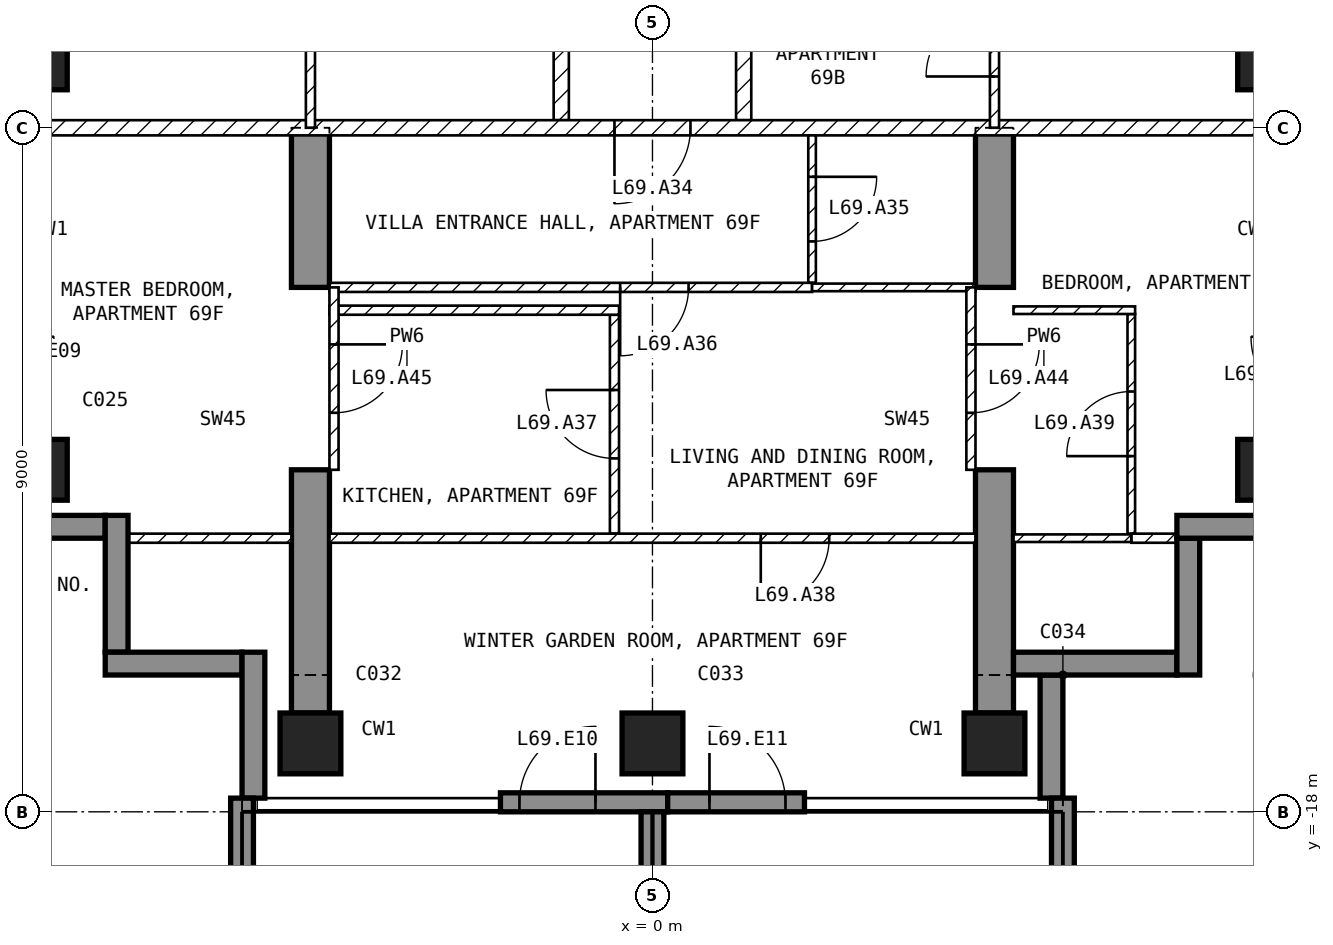
"""IFC4 building model, lengths in metres.
Left out: names, types, materials, properties, quantities, classifications, styles, units other than length and angle.
Written with IfcOpenShell. Run it as: python <this file> out.ifc"""

import sys

from ifc_helpers import new_model, si_unit, direction, frame, frame_2d, origin, origin_2d, place, context, subcontext, project, spatial, polyline, rectangle, outline, extrude, element, fill, save


model = new_model("IFC4")
c1 = context("Model", 3, precision=1e-05, world=origin(), true_north=direction((0.0, 1.0)))
c2 = subcontext(c1, "Body", "Model", "MODEL_VIEW")
j1 = project(units=[si_unit("LENGTHUNIT", "METRE"), si_unit("PLANEANGLEUNIT", "RADIAN")], contexts=[c1])
p1 = place(None, origin())
s1 = spatial("IfcSite", under=j1, at=p1, CompositionType="ELEMENT")
p2 = place(p1, origin())
s2 = spatial("IfcBuilding", under=s1, at=p2, CompositionType="ELEMENT")
p3 = place(p2, frame((0.0, 0.0, 271.0)))
s3 = spatial("IfcBuildingStorey", under=s2, at=p3, CompositionType="ELEMENT", Elevation=271.0)
for number, where, z_axis, x_axis in (
    (1, (-8.1, -13.5, -0.25), (0.0, 0.0, 1.0), (1.0, 0.0, 0.0)),
    (2, (-8.1, -8.1, -0.25), (0.0, 0.0, 1.0), (1.0, 0.0, 0.0)),
    (3, (-4.5, -17.1, -0.25), (0.0, 0.0, 1.0), (1.0, 0.0, 0.0)),
    (4, (0.0, -17.1, -0.25), (0.0, 0.0, 1.0), (1.0, 0.0, 0.0)),
    (5, (4.5, -17.1, -0.25), (0.0, 0.0, 1.0), (1.0, 0.0, 0.0)),
    (6, (8.1, -13.5, -0.25), (0.0, 0.0, 1.0), (1.0, 0.0, 0.0)),
    (7, (8.1, -8.1, -0.25), (0.0, 0.0, 1.0), (1.0, 0.0, 0.0)),
):
    element("IfcColumn", number, at=place(p3, frame(where, z_axis=z_axis, x_axis=x_axis)), inside=s3, PredefinedType="COLUMN", context=c2, shape_type="SweptSolid", body=[
        extrude(rectangle(XDim=0.8, YDim=0.8, at=origin_2d()), origin(), (0.0, 0.0, 1.0), 3.5),
    ])
for number, where, z_axis, x_axis in (
    (8, (-4.75, -16.7, -0.25), (1.0, 0.0, 0.0), (0.0, 1.0, 0.0)),
    (9, (4.25, -16.7, -0.25), (1.0, 0.0, 0.0), (0.0, 1.0, 0.0)),
):
    element("IfcWall", number, at=place(p3, frame(where, z_axis=z_axis, x_axis=x_axis)), inside=s3, PredefinedType="SHEAR", context=c2, shape_type="SweptSolid", body=[
        extrude(outline(polyline([(0.0, 0.0), (3.2, 0.0), (3.2, 2.65), (5.6, 2.65), (5.6, 0.0), (7.7, 0.0), (7.7, 3.5), (0.0, 3.5), (0.0, 0.0)])), origin(), (0.0, 0.0, 1.0), 0.5),
    ])
p4 = place(p3, frame((-2.0, -17.875, 0.0), z_axis=(0.0, 0.0, 1.0), x_axis=(1.0, 0.0, 0.0)))
e10 = element("IfcWall", 10, at=p4, inside=s3, PredefinedType="SOLIDWALL", context=c2, shape_type="SweptSolid", body=[
    extrude(rectangle(XDim=2.2, YDim=0.25, at=frame_2d((1.1, 0.0))), origin(), (0.0, 0.0, 1.0), 3.25),
])
p5 = place(p4, frame((0.25, 0.0, 0.0)))
e11 = element("IfcOpeningElement", 11, at=p5, cuts=e10, PredefinedType="OPENING", context=c2, shape_type="SweptSolid", body=[
    extrude(rectangle(XDim=1.0, YDim=2.4, at=frame_2d((0.5, 1.2))), frame((0.0, 0.135, 0.0), z_axis=(0.0, -1.0, 0.0), x_axis=(1.0, 0.0, 0.0)), (0.0, 0.0, 1.0), 0.27),
])
p6 = place(p3, frame((0.2, -17.875, 0.0), z_axis=(0.0, 0.0, 1.0), x_axis=(1.0, 0.0, 0.0)))
e12 = element("IfcWall", 12, at=p6, inside=s3, PredefinedType="SOLIDWALL", context=c2, shape_type="SweptSolid", body=[
    extrude(rectangle(XDim=1.8, YDim=0.25, at=frame_2d((0.9, 0.0))), origin(), (0.0, 0.0, 1.0), 3.25),
])
p7 = place(p6, frame((0.55, 0.0, 0.0)))
e13 = element("IfcOpeningElement", 13, at=p7, cuts=e12, PredefinedType="OPENING", context=c2, shape_type="SweptSolid", body=[
    extrude(rectangle(XDim=1.0, YDim=2.4, at=frame_2d((0.5, 1.2))), frame((0.0, 0.135, 0.0), z_axis=(0.0, -1.0, 0.0), x_axis=(1.0, 0.0, 0.0)), (0.0, 0.0, 1.0), 0.27),
])
p8 = place(p3, frame((5.25, -17.82, 0.0), z_axis=(0.0, 0.0, 1.0), x_axis=(0.0, 1.0, 0.0)))
e14 = element("IfcWall", 14, at=p8, inside=s3, PredefinedType="SOLIDWALL", context=c2, shape_type="SweptSolid", body=[
    extrude(rectangle(XDim=1.62, YDim=0.3, at=frame_2d((0.81, 0.0))), origin(), (0.0, 0.0, 1.0), 3.25),
])
p9 = place(p3, frame((4.75, -16.05, 0.0), z_axis=(0.0, 0.0, 1.0), x_axis=(1.0, 0.0, 0.0)))
e15 = element("IfcWall", 15, at=p9, inside=s3, PredefinedType="SOLIDWALL", context=c2, shape_type="SweptSolid", body=[
    extrude(rectangle(XDim=2.15, YDim=0.3, at=frame_2d((1.075, 0.0))), origin(), (0.0, 0.0, 1.0), 3.25),
])
p10 = place(p3, frame((7.05, -16.2, 0.0), z_axis=(0.0, 0.0, 1.0), x_axis=(0.0, 1.0, 0.0)))
e16 = element("IfcWall", 16, at=p10, inside=s3, PredefinedType="SOLIDWALL", context=c2, shape_type="SweptSolid", body=[
    extrude(rectangle(XDim=1.8, YDim=0.3, at=frame_2d((0.9, 0.0))), origin(), (0.0, 0.0, 1.0), 3.25),
])
p11 = place(p3, frame((6.9, -14.25, 0.0), z_axis=(0.0, 0.0, 1.0), x_axis=(1.0, 0.0, 0.0)))
e17 = element("IfcWall", 17, at=p11, inside=s3, PredefinedType="SOLIDWALL", context=c2, shape_type="SweptSolid", body=[
    extrude(rectangle(XDim=1.85, YDim=0.3, at=frame_2d((0.925, 0.0))), origin(), (0.0, 0.0, 1.0), 3.25),
])
p12 = place(p3, frame((-8.75, -14.25, 0.0), z_axis=(0.0, 0.0, 1.0), x_axis=(1.0, 0.0, 0.0)))
e18 = element("IfcWall", 18, at=p12, inside=s3, PredefinedType="SOLIDWALL", context=c2, shape_type="SweptSolid", body=[
    extrude(rectangle(XDim=1.55, YDim=0.3, at=frame_2d((0.775, 0.0))), origin(), (0.0, 0.0, 1.0), 3.25),
])
p13 = place(p3, frame((-7.05, -14.1, 0.0), z_axis=(0.0, 0.0, 1.0), x_axis=(0.0, -1.0, 0.0)))
e19 = element("IfcWall", 19, at=p13, inside=s3, PredefinedType="SOLIDWALL", context=c2, shape_type="SweptSolid", body=[
    extrude(rectangle(XDim=1.8, YDim=0.3, at=frame_2d((0.9, 0.0))), origin(), (0.0, 0.0, 1.0), 3.25),
])
p14 = place(p3, frame((-7.2, -16.05, 0.0), z_axis=(0.0, 0.0, 1.0), x_axis=(1.0, 0.0, 0.0)))
e20 = element("IfcWall", 20, at=p14, inside=s3, PredefinedType="SOLIDWALL", context=c2, shape_type="SweptSolid", body=[
    extrude(rectangle(XDim=1.8, YDim=0.3, at=frame_2d((0.9, 0.0))), origin(), (0.0, 0.0, 1.0), 3.25),
])
p15 = place(p3, frame((-5.25, -15.9, 0.0), z_axis=(0.0, 0.0, 1.0), x_axis=(0.0, -1.0, 0.0)))
e21 = element("IfcWall", 21, at=p15, inside=s3, PredefinedType="SOLIDWALL", context=c2, shape_type="SweptSolid", body=[
    extrude(rectangle(XDim=1.92, YDim=0.3, at=frame_2d((0.96, 0.0))), origin(), (0.0, 0.0, 1.0), 3.25),
])
p16 = place(p3, frame((-5.4, -17.82, 0.0), z_axis=(0.0, 0.0, 1.0), x_axis=(0.0, -1.0, 0.0)))
e22 = element("IfcWall", 22, at=p16, inside=s3, PredefinedType="SOLIDWALL", context=c2, shape_type="SweptSolid", body=[
    extrude(rectangle(XDim=2.88, YDim=0.3, at=frame_2d((1.44, 0.0))), origin(), (0.0, 0.0, 1.0), 3.25),
])
p17 = place(p3, frame((0.0, -18.0, 0.0), z_axis=(0.0, 0.0, 1.0), x_axis=(0.0, -1.0, 0.0)))
e23 = element("IfcWall", 23, at=p17, inside=s3, PredefinedType="SOLIDWALL", context=c2, shape_type="SweptSolid", body=[
    extrude(rectangle(XDim=2.7, YDim=0.3, at=frame_2d((1.35, 0.0))), origin(), (0.0, 0.0, 1.0), 3.25),
])
p18 = place(p3, frame((5.4, -17.82, 0.0), z_axis=(0.0, 0.0, 1.0), x_axis=(0.0, -1.0, 0.0)))
e24 = element("IfcWall", 24, at=p18, inside=s3, PredefinedType="SOLIDWALL", context=c2, shape_type="SweptSolid", body=[
    extrude(rectangle(XDim=2.88, YDim=0.3, at=frame_2d((1.44, 0.0))), origin(), (0.0, 0.0, 1.0), 3.25),
])
for number, where, z_axis, x_axis in (
    (25, (1.2, -4.6, 0.0), (0.0, 0.0, 1.0), (0.0, -1.0, 0.0)),
    (26, (-1.2, -8.9, 0.0), (0.0, 0.0, 1.0), (0.0, 1.0, 0.0)),
):
    element("IfcWall", number, at=place(p3, frame(where, z_axis=z_axis, x_axis=x_axis)), inside=s3, PredefinedType="PARTITIONING", context=c2, shape_type="SweptSolid", body=[
        extrude(rectangle(XDim=4.3, YDim=0.2, at=frame_2d((2.15, 0.0))), origin(), (0.0, 0.0, 1.0), 3.25),
    ])
p19 = place(p3, frame((8.92, -9.0, 0.0), z_axis=(0.0, 0.0, 1.0), x_axis=(-1.0, 0.0, 0.0)))
e27 = element("IfcWall", 27, at=p19, inside=s3, PredefinedType="PARTITIONING", context=c2, shape_type="SweptSolid", body=[
    extrude(rectangle(XDim=17.84, YDim=0.2, at=frame_2d((8.92, 0.0))), origin(), (0.0, 0.0, 1.0), 3.25),
])
p20 = place(p19, frame((8.42, 0.0, 0.0)))
e28 = element("IfcOpeningElement", 28, at=p20, cuts=e27, PredefinedType="OPENING", context=c2, shape_type="SweptSolid", body=[
    extrude(rectangle(XDim=1.0, YDim=2.1, at=frame_2d((0.5, 1.05))), frame((0.0, 0.11, 0.0), z_axis=(0.0, -1.0, 0.0), x_axis=(1.0, 0.0, 0.0)), (0.0, 0.0, 1.0), 0.22),
])
p21 = place(p3, frame((4.5, -9.0, 0.0), z_axis=(0.0, 0.0, 1.0), x_axis=(0.0, 1.0, 0.0)))
e29 = element("IfcWall", 29, at=p21, inside=s3, PredefinedType="PARTITIONING", context=c2, shape_type="SweptSolid", body=[
    extrude(rectangle(XDim=2.25, YDim=0.12, at=frame_2d((1.125, 0.0))), origin(), (0.0, 0.0, 1.0), 3.25),
])
p22 = place(p21, frame((0.675, 0.0, 0.0)))
e30 = element("IfcOpeningElement", 30, at=p22, cuts=e29, PredefinedType="OPENING", context=c2, shape_type="SweptSolid", body=[
    extrude(rectangle(XDim=0.9, YDim=2.1, at=frame_2d((0.45, 1.05))), frame((0.0, 0.07, 0.0), z_axis=(0.0, -1.0, 0.0), x_axis=(1.0, 0.0, 0.0)), (0.0, 0.0, 1.0), 0.14),
])
p23 = place(p3, frame((-4.5, -4.5, 0.0), z_axis=(0.0, 0.0, 1.0), x_axis=(0.0, -1.0, 0.0)))
e31 = element("IfcWall", 31, at=p23, inside=s3, PredefinedType="PARTITIONING", context=c2, shape_type="SweptSolid", body=[
    extrude(rectangle(XDim=4.5, YDim=0.12, at=frame_2d((2.25, 0.0))), origin(), (0.0, 0.0, 1.0), 3.25),
])
p24 = place(p23, frame((1.8, 0.0, 0.0)))
e32 = element("IfcOpeningElement", 32, at=p24, cuts=e31, PredefinedType="OPENING", context=c2, shape_type="SweptSolid", body=[
    extrude(rectangle(XDim=0.9, YDim=2.1, at=frame_2d((0.45, 1.05))), frame((0.0, 0.07, 0.0), z_axis=(0.0, -1.0, 0.0), x_axis=(1.0, 0.0, 0.0)), (0.0, 0.0, 1.0), 0.14),
])
p25 = place(p3, frame((2.1, -9.1, 0.0), z_axis=(0.0, 0.0, 1.0), x_axis=(0.0, -1.0, 0.0)))
e33 = element("IfcWall", 33, at=p25, inside=s3, PredefinedType="PARTITIONING", context=c2, shape_type="SweptSolid", body=[
    extrude(rectangle(XDim=1.94, YDim=0.1, at=frame_2d((0.97, 0.0))), origin(), (0.0, 0.0, 1.0), 3.25),
])
p26 = place(p25, frame((0.545, 0.0, 0.0)))
e34 = element("IfcOpeningElement", 34, at=p26, cuts=e33, PredefinedType="OPENING", context=c2, shape_type="SweptSolid", body=[
    extrude(rectangle(XDim=0.85, YDim=2.1, at=frame_2d((0.425, 1.05))), frame((0.0, 0.06, 0.0), z_axis=(0.0, -1.0, 0.0), x_axis=(1.0, 0.0, 0.0)), (0.0, 0.0, 1.0), 0.12),
])
p27 = place(p3, frame((2.1, -11.1, 0.0), z_axis=(0.0, 0.0, 1.0), x_axis=(-1.0, 0.0, 0.0)))
e35 = element("IfcWall", 35, at=p27, inside=s3, PredefinedType="PARTITIONING", context=c2, shape_type="SweptSolid", body=[
    extrude(rectangle(XDim=6.35, YDim=0.12, at=frame_2d((3.175, 0.0))), origin(), (0.0, 0.0, 1.0), 3.25),
])
p28 = place(p27, frame((1.625, 0.0, 0.0)))
e36 = element("IfcOpeningElement", 36, at=p28, cuts=e35, PredefinedType="OPENING", context=c2, shape_type="SweptSolid", body=[
    extrude(rectangle(XDim=0.9, YDim=2.1, at=frame_2d((0.45, 1.05))), frame((0.0, 0.07, 0.0), z_axis=(0.0, -1.0, 0.0), x_axis=(1.0, 0.0, 0.0)), (0.0, 0.0, 1.0), 0.14),
])
p29 = place(p3, frame((4.25, -11.1, 0.0), z_axis=(0.0, 0.0, 1.0), x_axis=(-1.0, 0.0, 0.0)))
e37 = element("IfcWall", 37, at=p29, inside=s3, PredefinedType="PARTITIONING", context=c2, shape_type="SweptSolid", body=[
    extrude(rectangle(XDim=2.15, YDim=0.1, at=frame_2d((1.075, 0.0))), origin(), (0.0, 0.0, 1.0), 3.25),
])
p30 = place(p3, frame((-0.5, -14.34, 0.0), z_axis=(0.0, 0.0, 1.0), x_axis=(0.0, 1.0, 0.0)))
e38 = element("IfcWall", 38, at=p30, inside=s3, PredefinedType="PARTITIONING", context=c2, shape_type="SweptSolid", body=[
    extrude(rectangle(XDim=2.88, YDim=0.12, at=frame_2d((1.44, 0.0))), origin(), (0.0, 0.0, 1.0), 3.25),
])
p31 = place(p30, frame((0.99, 0.0, 0.0)))
e39 = element("IfcOpeningElement", 39, at=p31, cuts=e38, PredefinedType="OPENING", context=c2, shape_type="SweptSolid", body=[
    extrude(rectangle(XDim=0.9, YDim=2.1, at=frame_2d((0.45, 1.05))), frame((0.0, 0.07, 0.0), z_axis=(0.0, -1.0, 0.0), x_axis=(1.0, 0.0, 0.0)), (0.0, 0.0, 1.0), 0.14),
])
p32 = place(p3, frame((-0.44, -11.4, 0.0), z_axis=(0.0, 0.0, 1.0), x_axis=(-1.0, 0.0, 0.0)))
e40 = element("IfcWall", 40, at=p32, inside=s3, PredefinedType="PARTITIONING", context=c2, shape_type="SweptSolid", body=[
    extrude(rectangle(XDim=3.81, YDim=0.12, at=frame_2d((1.905, 0.0))), origin(), (0.0, 0.0, 1.0), 3.25),
])
p33 = place(p3, frame((4.25, -14.4, 0.0), z_axis=(0.0, 0.0, 1.0), x_axis=(-1.0, 0.0, 0.0)))
e41 = element("IfcWall", 41, at=p33, inside=s3, PredefinedType="PARTITIONING", context=c2, shape_type="SweptSolid", body=[
    extrude(rectangle(XDim=8.5, YDim=0.12, at=frame_2d((4.25, 0.0))), origin(), (0.0, 0.0, 1.0), 3.25),
])
p34 = place(p33, frame((1.925, 0.0, 0.0)))
e42 = element("IfcOpeningElement", 42, at=p34, cuts=e41, PredefinedType="OPENING", context=c2, shape_type="SweptSolid", body=[
    extrude(rectangle(XDim=0.9, YDim=2.1, at=frame_2d((0.45, 1.05))), frame((0.0, 0.07, 0.0), z_axis=(0.0, -1.0, 0.0), x_axis=(1.0, 0.0, 0.0)), (0.0, 0.0, 1.0), 0.14),
])
p35 = place(p3, frame((6.3, -14.34, 0.0), z_axis=(0.0, 0.0, 1.0), x_axis=(0.0, 1.0, 0.0)))
e43 = element("IfcWall", 43, at=p35, inside=s3, PredefinedType="PARTITIONING", context=c2, shape_type="SweptSolid", body=[
    extrude(rectangle(XDim=2.89, YDim=0.1, at=frame_2d((1.445, 0.0))), origin(), (0.0, 0.0, 1.0), 3.25),
])
p36 = place(p35, frame((1.02, 0.0, 0.0)))
e44 = element("IfcOpeningElement", 44, at=p36, cuts=e43, PredefinedType="OPENING", context=c2, shape_type="SweptSolid", body=[
    extrude(rectangle(XDim=0.85, YDim=2.1, at=frame_2d((0.425, 1.05))), frame((0.0, 0.06, 0.0), z_axis=(0.0, -1.0, 0.0), x_axis=(1.0, 0.0, 0.0)), (0.0, 0.0, 1.0), 0.12),
])
p37 = place(p3, frame((6.35, -11.4, 0.0), z_axis=(0.0, 0.0, 1.0), x_axis=(-1.0, 0.0, 0.0)))
e45 = element("IfcWall", 45, at=p37, inside=s3, PredefinedType="PARTITIONING", context=c2, shape_type="SweptSolid", body=[
    extrude(rectangle(XDim=1.6, YDim=0.1, at=frame_2d((0.8, 0.0))), origin(), (0.0, 0.0, 1.0), 3.25),
])
p38 = place(p3, frame((7.12, -14.4, 0.0), z_axis=(0.0, 0.0, 1.0), x_axis=(-1.0, 0.0, 0.0)))
e46 = element("IfcWall", 46, at=p38, inside=s3, PredefinedType="PARTITIONING", context=c2, shape_type="SweptSolid", body=[
    extrude(rectangle(XDim=0.82, YDim=0.12, at=frame_2d((0.41, 0.0))), origin(), (0.0, 0.0, 1.0), 3.25),
])
p39 = place(p3, frame((6.3, -14.4, 0.0), z_axis=(0.0, 0.0, 1.0), x_axis=(-1.0, 0.0, 0.0)))
e47 = element("IfcWall", 47, at=p39, inside=s3, PredefinedType="PARTITIONING", context=c2, shape_type="SweptSolid", body=[
    extrude(rectangle(XDim=1.55, YDim=0.1, at=frame_2d((0.775, 0.0))), origin(), (0.0, 0.0, 1.0), 3.25),
])
p40 = place(p3, frame((-4.75, -14.4, 0.0), z_axis=(0.0, 0.0, 1.0), x_axis=(-1.0, 0.0, 0.0)))
e48 = element("IfcWall", 48, at=p40, inside=s3, PredefinedType="PARTITIONING", context=c2, shape_type="SweptSolid", body=[
    extrude(rectangle(XDim=2.37, YDim=0.12, at=frame_2d((1.185, 0.0))), origin(), (0.0, 0.0, 1.0), 3.25),
])
p41 = place(p3, frame((4.19, -11.1, 0.0), z_axis=(0.0, 0.0, 1.0), x_axis=(0.0, -1.0, 0.0)))
e49 = element("IfcWall", 49, at=p41, inside=s3, PredefinedType="PARTITIONING", context=c2, shape_type="SweptSolid", body=[
    extrude(rectangle(XDim=2.4, YDim=0.12, at=frame_2d((1.2, 0.0))), origin(), (0.0, 0.0, 1.0), 2.4),
])
p42 = place(p41, frame((0.75, 0.0, 0.0)))
e50 = element("IfcOpeningElement", 50, at=p42, cuts=e49, PredefinedType="OPENING", context=c2, shape_type="SweptSolid", body=[
    extrude(rectangle(XDim=0.9, YDim=2.1, at=frame_2d((0.45, 1.05))), frame((0.0, 0.07, 0.0), z_axis=(0.0, -1.0, 0.0), x_axis=(1.0, 0.0, 0.0)), (0.0, 0.0, 1.0), 0.14),
])
p43 = place(p3, frame((-4.19, -11.1, 0.0), z_axis=(0.0, 0.0, 1.0), x_axis=(0.0, -1.0, 0.0)))
e51 = element("IfcWall", 51, at=p43, inside=s3, PredefinedType="PARTITIONING", context=c2, shape_type="SweptSolid", body=[
    extrude(rectangle(XDim=2.4, YDim=0.12, at=frame_2d((1.2, 0.0))), origin(), (0.0, 0.0, 1.0), 2.4),
])
p44 = place(p43, frame((0.75, 0.0, 0.0)))
e52 = element("IfcOpeningElement", 52, at=p44, cuts=e51, PredefinedType="OPENING", context=c2, shape_type="SweptSolid", body=[
    extrude(rectangle(XDim=0.9, YDim=2.1, at=frame_2d((0.45, 1.05))), frame((0.0, 0.07, 0.0), z_axis=(0.0, -1.0, 0.0), x_axis=(1.0, 0.0, 0.0)), (0.0, 0.0, 1.0), 0.14),
])
p45 = place(p5, origin())
e53 = element("IfcDoor", 53, at=p45, inside=s3, OperationType="SINGLE_SWING_RIGHT", PredefinedType="DOOR", context=c2, shape_type="SweptSolid", body=[
    extrude(rectangle(XDim=1.0, YDim=2.4, at=frame_2d((0.5, 1.2))), frame((0.0, 0.025, 0.0), z_axis=(0.0, -1.0, 0.0), x_axis=(1.0, 0.0, 0.0)), (0.0, 0.0, 1.0), 0.05),
])
fill(e11, e53)
p46 = place(p7, origin())
e54 = element("IfcDoor", 54, at=p46, inside=s3, OperationType="SINGLE_SWING_LEFT", PredefinedType="DOOR", context=c2, shape_type="SweptSolid", body=[
    extrude(rectangle(XDim=1.0, YDim=2.4, at=frame_2d((0.5, 1.2))), frame((0.0, 0.025, 0.0), z_axis=(0.0, -1.0, 0.0), x_axis=(1.0, 0.0, 0.0)), (0.0, 0.0, 1.0), 0.05),
])
fill(e13, e54)
p47 = place(p22, origin())
e55 = element("IfcDoor", 55, at=p47, inside=s3, OperationType="SINGLE_SWING_LEFT", PredefinedType="DOOR", context=c2, shape_type="SweptSolid", body=[
    extrude(rectangle(XDim=0.9, YDim=2.1, at=frame_2d((0.45, 1.05))), frame((0.0, 0.025, 0.0), z_axis=(0.0, -1.0, 0.0), x_axis=(1.0, 0.0, 0.0)), (0.0, 0.0, 1.0), 0.05),
])
fill(e30, e55)
p48 = place(p20, origin())
e56 = element("IfcDoor", 56, at=p48, inside=s3, OperationType="SINGLE_SWING_RIGHT", PredefinedType="DOOR", context=c2, shape_type="SweptSolid", body=[
    extrude(rectangle(XDim=1.0, YDim=2.1, at=frame_2d((0.5, 1.05))), frame((0.0, 0.025, 0.0), z_axis=(0.0, -1.0, 0.0), x_axis=(1.0, 0.0, 0.0)), (0.0, 0.0, 1.0), 0.05),
])
fill(e28, e56)
p49 = place(p26, origin())
e57 = element("IfcDoor", 57, at=p49, inside=s3, OperationType="SINGLE_SWING_LEFT", PredefinedType="DOOR", context=c2, shape_type="SweptSolid", body=[
    extrude(rectangle(XDim=0.85, YDim=2.1, at=frame_2d((0.425, 1.05))), frame((0.0, 0.025, 0.0), z_axis=(0.0, -1.0, 0.0), x_axis=(1.0, 0.0, 0.0)), (0.0, 0.0, 1.0), 0.05),
])
fill(e34, e57)
p50 = place(p28, origin())
e58 = element("IfcDoor", 58, at=p50, inside=s3, OperationType="SINGLE_SWING_RIGHT", PredefinedType="DOOR", context=c2, shape_type="SweptSolid", body=[
    extrude(rectangle(XDim=0.9, YDim=2.1, at=frame_2d((0.45, 1.05))), frame((0.0, 0.025, 0.0), z_axis=(0.0, -1.0, 0.0), x_axis=(1.0, 0.0, 0.0)), (0.0, 0.0, 1.0), 0.05),
])
fill(e36, e58)
p51 = place(p31, origin())
e59 = element("IfcDoor", 59, at=p51, inside=s3, OperationType="SINGLE_SWING_RIGHT", PredefinedType="DOOR", context=c2, shape_type="SweptSolid", body=[
    extrude(rectangle(XDim=0.9, YDim=2.1, at=frame_2d((0.45, 1.05))), frame((0.0, 0.025, 0.0), z_axis=(0.0, -1.0, 0.0), x_axis=(1.0, 0.0, 0.0)), (0.0, 0.0, 1.0), 0.05),
])
fill(e39, e59)
p52 = place(p34, origin())
e60 = element("IfcDoor", 60, at=p52, inside=s3, OperationType="SINGLE_SWING_RIGHT", PredefinedType="DOOR", context=c2, shape_type="SweptSolid", body=[
    extrude(rectangle(XDim=0.9, YDim=2.1, at=frame_2d((0.45, 1.05))), frame((0.0, 0.025, 0.0), z_axis=(0.0, -1.0, 0.0), x_axis=(1.0, 0.0, 0.0)), (0.0, 0.0, 1.0), 0.05),
])
fill(e42, e60)
p53 = place(p36, origin())
e61 = element("IfcDoor", 61, at=p53, inside=s3, OperationType="SINGLE_SWING_LEFT", PredefinedType="DOOR", context=c2, shape_type="SweptSolid", body=[
    extrude(rectangle(XDim=0.85, YDim=2.1, at=frame_2d((0.425, 1.05))), frame((0.0, 0.025, 0.0), z_axis=(0.0, -1.0, 0.0), x_axis=(1.0, 0.0, 0.0)), (0.0, 0.0, 1.0), 0.05),
])
fill(e44, e61)
p54 = place(p42, origin())
e62 = element("IfcDoor", 62, at=p54, inside=s3, OperationType="SINGLE_SWING_LEFT", PredefinedType="DOOR", context=c2, shape_type="SweptSolid", body=[
    extrude(rectangle(XDim=0.9, YDim=2.1, at=frame_2d((0.45, 1.05))), frame((0.0, 0.025, 0.0), z_axis=(0.0, -1.0, 0.0), x_axis=(1.0, 0.0, 0.0)), (0.0, 0.0, 1.0), 0.05),
])
fill(e50, e62)
p55 = place(p44, origin())
e63 = element("IfcDoor", 63, at=p55, inside=s3, OperationType="SINGLE_SWING_LEFT", PredefinedType="DOOR", context=c2, shape_type="SweptSolid", body=[
    extrude(rectangle(XDim=0.9, YDim=2.1, at=frame_2d((0.45, 1.05))), frame((0.0, 0.025, 0.0), z_axis=(0.0, -1.0, 0.0), x_axis=(1.0, 0.0, 0.0)), (0.0, 0.0, 1.0), 0.05),
])
fill(e52, e63)
save(model, sys.argv[1])
